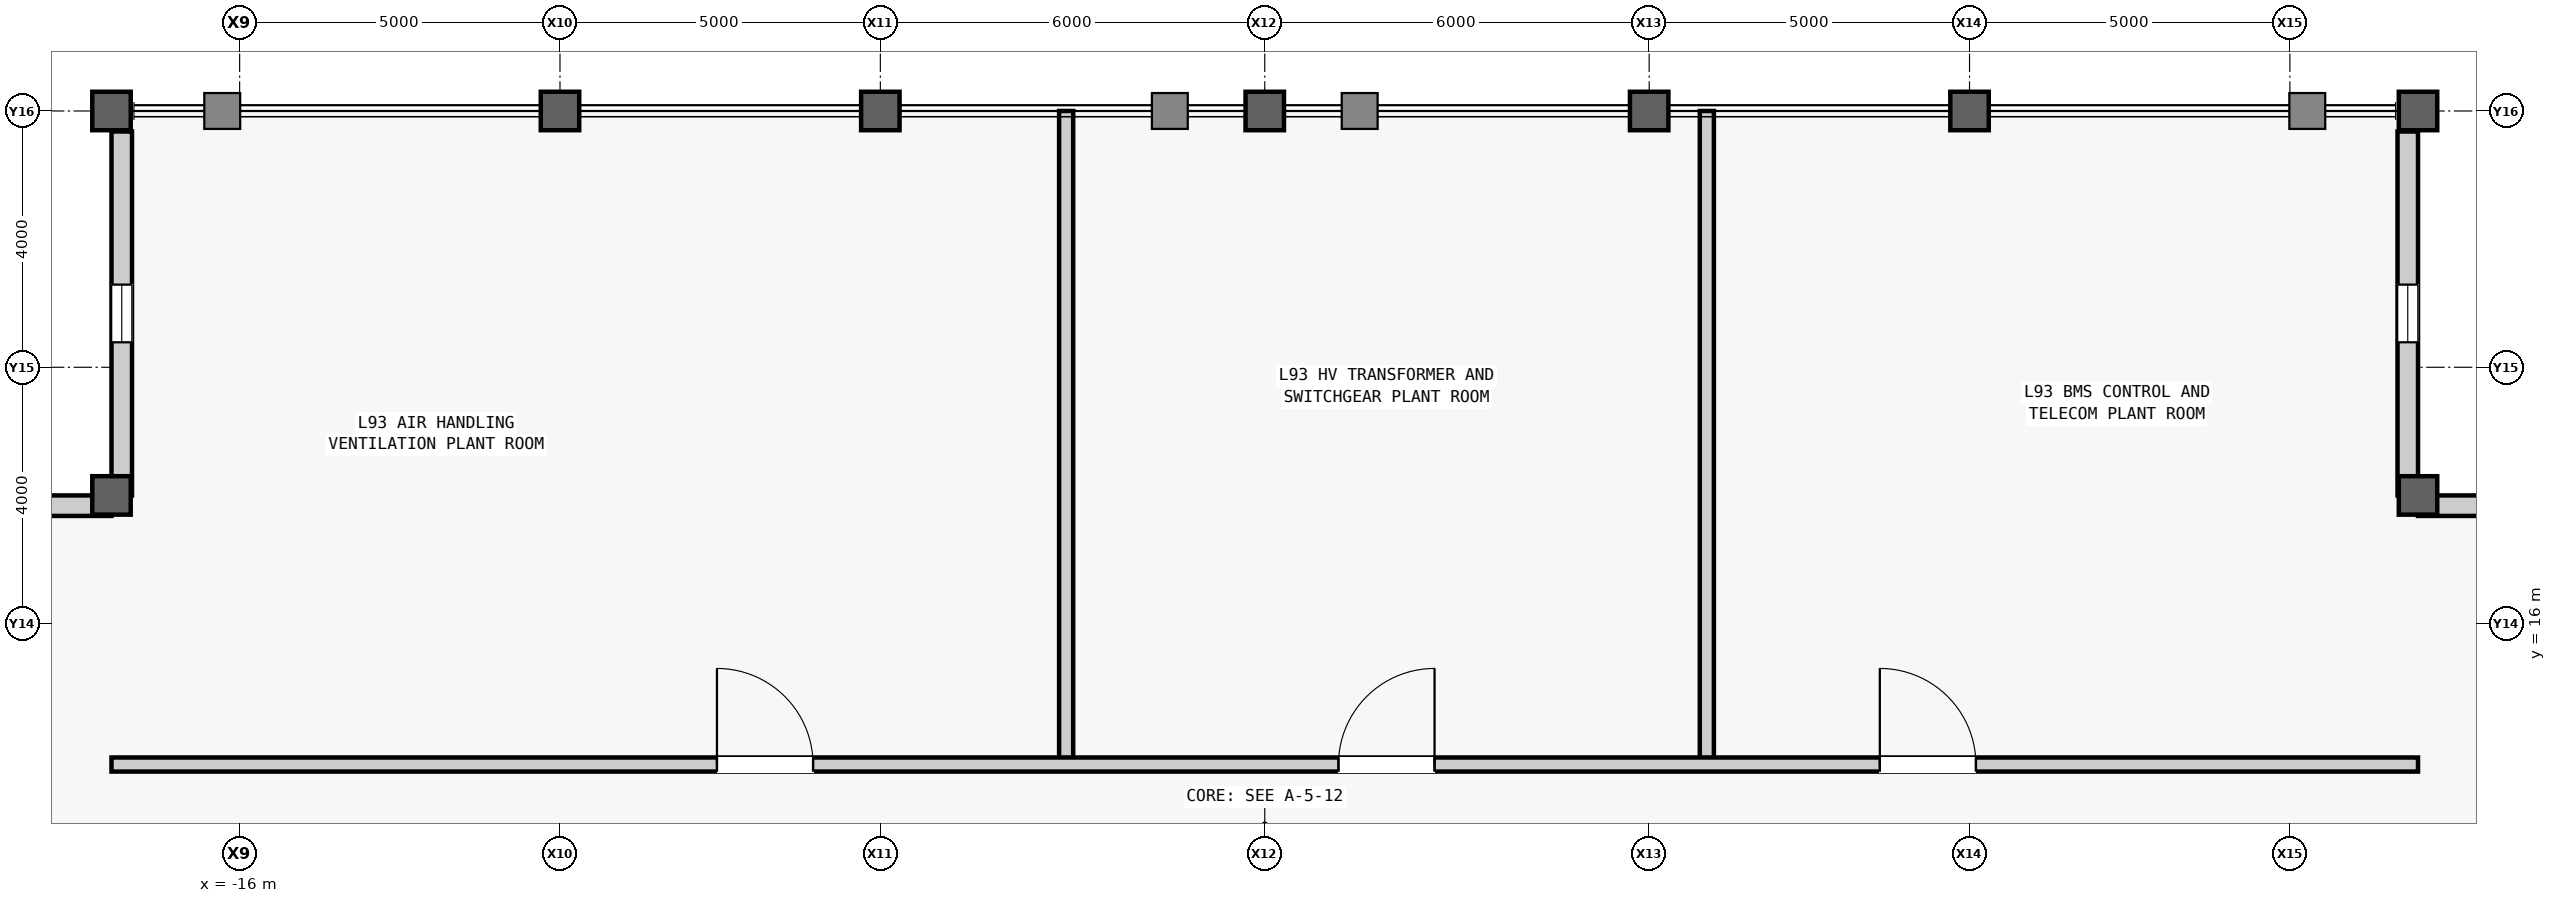
"""IFC4 building model, lengths in metres.
Left out: names, types, materials, properties, quantities, classifications, styles, units other than length and angle.
Written with IfcOpenShell. Run it as: python <this file> out.ifc"""

import sys

from ifc_helpers import new_model, si_unit, direction, frame, frame_2d, origin, origin_2d, place, context, subcontext, project, spatial, rectangle, hollow_rectangle, extrude, source, transform, mapped, element, fill, save


model = new_model("IFC4")
c1 = context("Model", 3, precision=1e-05, world=origin(), true_north=direction((0.0, 1.0)))
c2 = subcontext(c1, "Body", "Model", "MODEL_VIEW")
j1 = project(units=[si_unit("LENGTHUNIT", "METRE"), si_unit("PLANEANGLEUNIT", "RADIAN")], contexts=[c1])
p1 = place(None, origin())
s1 = spatial("IfcSite", under=j1, at=p1, CompositionType="ELEMENT")
p2 = place(p1, origin())
s2 = spatial("IfcBuilding", under=s1, at=p2, CompositionType="ELEMENT")
p3 = place(p2, frame((0.0, 0.0, 394.7)))
s3 = spatial("IfcBuildingStorey", under=s2, at=p3, CompositionType="ELEMENT", Elevation=394.7)
m1 = source(origin(), c2, "Body", "SweptSolid", [
    extrude(hollow_rectangle(XDim=0.6, YDim=0.6, WallThickness=0.035, at=origin_2d()), origin(), (0.0, 0.0, 1.0), 4.8),
])
for number, where, z_axis, x_axis in (
    (1, (-18.0, 18.0, 0.0), (0.0, 0.0, 1.0), (1.0, 0.0, 0.0)),
    (2, (-18.0, 24.0, 0.0), (0.0, 0.0, 1.0), (1.0, 0.0, 0.0)),
    (3, (-11.0, 24.0, 0.0), (0.0, 0.0, 1.0), (1.0, 0.0, 0.0)),
    (4, (-6.0, 24.0, 0.0), (0.0, 0.0, 1.0), (1.0, 0.0, 0.0)),
    (5, (0.0, 24.0, 0.0), (0.0, 0.0, 1.0), (1.0, 0.0, 0.0)),
    (6, (6.0, 24.0, 0.0), (0.0, 0.0, 1.0), (1.0, 0.0, 0.0)),
    (7, (11.0, 24.0, 0.0), (0.0, 0.0, 1.0), (1.0, 0.0, 0.0)),
    (8, (18.0, 18.0, 0.0), (0.0, 0.0, 1.0), (1.0, 0.0, 0.0)),
    (9, (18.0, 24.0, 0.0), (0.0, 0.0, 1.0), (1.0, 0.0, 0.0)),
):
    element("IfcColumn", number, at=place(p3, frame(where, z_axis=z_axis, x_axis=x_axis)), inside=s3, PredefinedType="COLUMN", context=c2, shape_type="MappedRepresentation", body=[
        mapped(m1, transform((0.0, 0.0, 0.0), scale=1.0)),
    ])
m2 = source(origin(), c2, "Body", "SweptSolid", [
    extrude(rectangle(XDim=5.68, YDim=0.32, at=frame_2d((2.84, 0.0))), origin(), (0.0, 0.0, 1.0), 3.901),
])
p4 = place(p3, frame((18.0, 17.84, 0.0), z_axis=(0.0, 0.0, 1.0), x_axis=(1.0, 0.0, 0.0)))
e10 = element("IfcWall", 10, at=p4, inside=s3, PredefinedType="STANDARD", context=c2, shape_type="MappedRepresentation", body=[
    mapped(m2, transform((0.0, 0.0, 0.0), scale=1.0)),
])
m3 = source(origin(), c2, "Body", "SweptSolid", [
    extrude(rectangle(XDim=0.9, YDim=2.4, at=frame_2d((0.45, 1.2))), frame((0.0, 0.17, 0.0), z_axis=(0.0, -1.0, 0.0), x_axis=(1.0, 0.0, 0.0)), (0.0, 0.0, 1.0), 0.34),
])
p5 = place(p4, frame((2.39, 0.0, 0.7)))
e11 = element("IfcOpeningElement", 11, at=p5, cuts=e10, PredefinedType="OPENING", context=c2, shape_type="MappedRepresentation", body=[
    mapped(m3, transform((0.0, 0.0, 0.0), scale=1.0)),
])
p6 = place(p3, frame((17.84, 18.0, 0.0), z_axis=(0.0, 0.0, 1.0), x_axis=(0.0, 1.0, 0.0)))
e12 = element("IfcWall", 12, at=p6, inside=s3, PredefinedType="STANDARD", context=c2, shape_type="MappedRepresentation", body=[
    mapped(m2, transform((0.0, 0.0, 0.0), scale=1.0)),
])
p7 = place(p6, frame((2.39, 0.0, 0.7)))
e13 = element("IfcOpeningElement", 13, at=p7, cuts=e12, PredefinedType="OPENING", context=c2, shape_type="MappedRepresentation", body=[
    mapped(m3, transform((0.0, 0.0, 0.0), scale=1.0)),
])
p8 = place(p3, frame((-17.84, 18.0, 0.0), z_axis=(0.0, 0.0, 1.0), x_axis=(0.0, 1.0, 0.0)))
e14 = element("IfcWall", 14, at=p8, inside=s3, PredefinedType="STANDARD", context=c2, shape_type="MappedRepresentation", body=[
    mapped(m2, transform((0.0, 0.0, 0.0), scale=1.0)),
])
p9 = place(p8, frame((2.39, 0.0, 0.7)))
e15 = element("IfcOpeningElement", 15, at=p9, cuts=e14, PredefinedType="OPENING", context=c2, shape_type="MappedRepresentation", body=[
    mapped(m3, transform((0.0, 0.0, 0.0), scale=1.0)),
])
p10 = place(p3, frame((-18.0, 17.84, 0.0), z_axis=(0.0, 0.0, 1.0), x_axis=(-1.0, 0.0, 0.0)))
e16 = element("IfcWall", 16, at=p10, inside=s3, PredefinedType="STANDARD", context=c2, shape_type="MappedRepresentation", body=[
    mapped(m2, transform((0.0, 0.0, 0.0), scale=1.0)),
])
p11 = place(p10, frame((2.39, 0.0, 0.7)))
e17 = element("IfcOpeningElement", 17, at=p11, cuts=e16, PredefinedType="OPENING", context=c2, shape_type="MappedRepresentation", body=[
    mapped(m3, transform((0.0, 0.0, 0.0), scale=1.0)),
])
m4 = source(origin(), c2, "Body", "SweptSolid", [
    extrude(rectangle(XDim=10.2, YDim=0.22, at=frame_2d((5.1, 0.0))), origin(), (0.0, 0.0, 1.0), 4.45),
])
for number, where, z_axis, x_axis in (
    (18, (-3.1, 13.8, 0.0), (0.0, 0.0, 1.0), (0.0, 1.0, 0.0)),
    (19, (6.9, 13.8, 0.0), (0.0, 0.0, 1.0), (0.0, 1.0, 0.0)),
):
    element("IfcWall", number, at=place(p3, frame(where, z_axis=z_axis, x_axis=x_axis)), inside=s3, PredefinedType="PARTITIONING", context=c2, shape_type="MappedRepresentation", body=[
        mapped(m4, transform((0.0, 0.0, 0.0), scale=1.0)),
    ])
m5 = source(origin(), c2, "Body", "SweptSolid", [
    extrude(rectangle(XDim=36.0, YDim=0.22, at=frame_2d((18.0, 0.0))), origin(), (0.0, 0.0, 1.0), 4.45),
])
p12 = place(p3, frame((-18.0, 13.8, 0.0), z_axis=(0.0, 0.0, 1.0), x_axis=(1.0, 0.0, 0.0)))
e20 = element("IfcWall", 20, at=p12, inside=s3, PredefinedType="PARTITIONING", context=c2, shape_type="MappedRepresentation", body=[
    mapped(m5, transform((0.0, 0.0, 0.0), scale=1.0)),
])
m6 = source(origin(), c2, "Body", "SweptSolid", [
    extrude(rectangle(XDim=1.5, YDim=2.3, at=frame_2d((0.75, 1.15))), frame((0.0, 0.12, 0.0), z_axis=(0.0, -1.0, 0.0), x_axis=(1.0, 0.0, 0.0)), (0.0, 0.0, 1.0), 0.24),
])
p13 = place(p12, frame((9.45, 0.0, 0.0)))
e21 = element("IfcOpeningElement", 21, at=p13, cuts=e20, PredefinedType="OPENING", context=c2, shape_type="MappedRepresentation", body=[
    mapped(m6, transform((0.0, 0.0, 0.0), scale=1.0)),
])
p14 = place(p12, frame((19.15, 0.0, 0.0)))
e22 = element("IfcOpeningElement", 22, at=p14, cuts=e20, PredefinedType="OPENING", context=c2, shape_type="MappedRepresentation", body=[
    mapped(m6, transform((0.0, 0.0, 0.0), scale=1.0)),
])
p15 = place(p12, frame((27.6, 0.0, 0.0)))
e23 = element("IfcOpeningElement", 23, at=p15, cuts=e20, PredefinedType="OPENING", context=c2, shape_type="MappedRepresentation", body=[
    mapped(m6, transform((0.0, 0.0, 0.0), scale=1.0)),
])
m7 = source(origin(), c2, "Body", "SweptSolid", [
    extrude(rectangle(XDim=0.9, YDim=2.4, at=frame_2d((0.45, 1.2))), frame((0.0, 0.03, 0.0), z_axis=(0.0, -1.0, 0.0), x_axis=(1.0, 0.0, 0.0)), (0.0, 0.0, 1.0), 0.06),
])
p16 = place(p7, origin())
e24 = element("IfcWindow", 24, at=p16, inside=s3, PartitioningType="SINGLE_PANEL", PredefinedType="WINDOW", context=c2, shape_type="MappedRepresentation", body=[
    mapped(m7, transform((0.0, 0.0, 0.0), scale=1.0)),
])
fill(e13, e24)
p17 = place(p9, origin())
e25 = element("IfcWindow", 25, at=p17, inside=s3, PartitioningType="SINGLE_PANEL", PredefinedType="WINDOW", context=c2, shape_type="MappedRepresentation", body=[
    mapped(m7, transform((0.0, 0.0, 0.0), scale=1.0)),
])
fill(e15, e25)
m8 = source(origin(), c2, "Body", "SweptSolid", [
    extrude(rectangle(XDim=1.5, YDim=2.3, at=frame_2d((0.75, 1.15))), frame((0.0, 0.025, 0.0), z_axis=(0.0, -1.0, 0.0), x_axis=(1.0, 0.0, 0.0)), (0.0, 0.0, 1.0), 0.05),
])
p18 = place(p13, origin())
e26 = element("IfcDoor", 26, at=p18, inside=s3, OperationType="SINGLE_SWING_LEFT", PredefinedType="DOOR", context=c2, shape_type="MappedRepresentation", body=[
    mapped(m8, transform((0.0, 0.0, 0.0), scale=1.0)),
])
fill(e21, e26)
p19 = place(p14, origin())
e27 = element("IfcDoor", 27, at=p19, inside=s3, OperationType="SINGLE_SWING_RIGHT", PredefinedType="DOOR", context=c2, shape_type="MappedRepresentation", body=[
    mapped(m8, transform((0.0, 0.0, 0.0), scale=1.0)),
])
fill(e22, e27)
p20 = place(p15, origin())
e28 = element("IfcDoor", 28, at=p20, inside=s3, OperationType="SINGLE_SWING_LEFT", PredefinedType="DOOR", context=c2, shape_type="MappedRepresentation", body=[
    mapped(m8, transform((0.0, 0.0, 0.0), scale=1.0)),
])
fill(e23, e28)
save(model, sys.argv[1])
